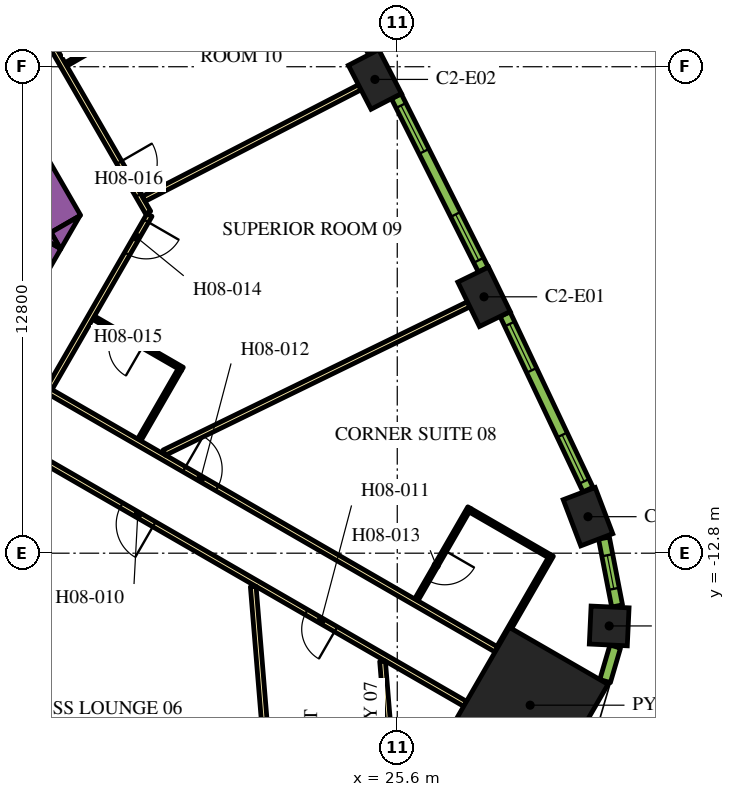
"""IFC4 building model, lengths in metres.
Left out: names, types, materials, properties, quantities, classifications, styles, units other than length and angle.
Written with IfcOpenShell. Run it as: python <this file> out.ifc"""

import sys

from ifc_helpers import new_model, si_unit, direction, frame, frame_2d, origin, origin_2d, place, context, subcontext, project, spatial, polyline, rectangle, outline, extrude, element, fill, save


model = new_model("IFC4")
c1 = context("Model", 3, precision=1e-05, world=origin(), true_north=direction((0.0, 1.0)))
c2 = subcontext(c1, "Body", "Model", "MODEL_VIEW")
j1 = project(units=[si_unit("LENGTHUNIT", "METRE"), si_unit("PLANEANGLEUNIT", "RADIAN")], contexts=[c1])
p1 = place(None, origin())
s1 = spatial("IfcSite", under=j1, at=p1, CompositionType="ELEMENT")
p2 = place(p1, origin())
s2 = spatial("IfcBuilding", under=s1, at=p2, CompositionType="ELEMENT")
p3 = place(p2, frame((0.0, 0.0, 114.9)))
s3 = spatial("IfcBuildingStorey", under=s2, at=p3, CompositionType="ELEMENT", Elevation=114.9)
p4 = place(p3, frame((29.097, -16.799, 0.0), z_axis=(0.0, 0.0, 1.0), x_axis=(0.866025403784, -0.5, 0.0)))
e1 = element("IfcColumn", 1, at=p4, inside=s3, PredefinedType="COLUMN", context=c2, shape_type="SweptSolid", body=[
    extrude(rectangle(XDim=3.0, YDim=3.0, at=origin_2d()), origin(), (0.0, 0.0, 1.0), 3.9),
])
p5 = place(p3, frame((31.177, -14.714, 0.0), z_axis=(0.0, 0.0, 1.0), x_axis=(0.046756026083, 0.998906338965, 0.0)))
e2 = element("IfcColumn", 2, at=p5, inside=s3, PredefinedType="COLUMN", context=c2, shape_type="SweptSolid", body=[
    extrude(rectangle(XDim=1.0, YDim=1.0, at=origin_2d()), origin(), (0.0, 0.0, 1.0), 3.9),
])
for number, where, z_axis, x_axis in (
    (3, (30.619, -11.839, 0.0), (0.0, 0.0, 1.0), (-0.355, 0.935, 0.0)),
    (4, (27.883, -6.054, 0.0), (0.0, 0.0, 1.0), (-0.438, 0.899, 0.0)),
    (5, (25.012, -0.334, 0.0), (0.0, 0.0, 1.0), (-0.459, 0.888, 0.0)),
):
    element("IfcColumn", number, at=place(p3, frame(where, z_axis=z_axis, x_axis=x_axis)), inside=s3, PredefinedType="COLUMN", context=c2, shape_type="SweptSolid", body=[
        extrude(rectangle(XDim=1.3, YDim=0.9, at=origin_2d()), origin(), (0.0, 0.0, 1.0), 3.9),
    ])
p6 = place(p3, frame((6.776, 13.364, 0.0), z_axis=(0.0, 0.0, 1.0), x_axis=(0.500004177138, -0.8660229921, 0.0)))
e6 = element("IfcWall", 6, at=p6, inside=s3, PredefinedType="SOLIDWALL", context=c2, shape_type="SweptSolid", body=[
    extrude(rectangle(XDim=20.204, YDim=0.9, at=frame_2d((10.102, 0.0))), origin(), (0.0, 0.0, 1.0), 3.9),
])
p7 = place(p3, origin())
e7 = element("IfcWall", 7, at=p7, inside=s3, PredefinedType="SOLIDWALL", context=c2, shape_type="SweptSolid", body=[
    extrude(outline(polyline([(16.743, -4.8), (16.489, -4.36), (17.251, -3.92), (16.743, -4.8)])), origin(), (0.0, 0.0, 1.0), 3.9),
])
p8 = place(p3, frame((11.943, -12.214, 0.0), z_axis=(0.0, 0.0, 1.0), x_axis=(0.49998092645, 0.866036415623, 0.0)))
e8 = element("IfcWall", 8, at=p8, inside=s3, PredefinedType="SOLIDWALL", context=c2, shape_type="SweptSolid", body=[
    extrude(rectangle(XDim=8.83, YDim=0.9, at=frame_2d((4.415, 0.0))), origin(), (0.0, 0.0, 1.0), 3.9),
])
e9 = element("IfcWall", 9, at=p7, inside=s3, PredefinedType="SOLIDWALL", context=c2, shape_type="SweptSolid", body=[
    extrude(outline(polyline([(16.223, -3.9), (16.732, -4.78), (15.969, -4.34), (16.223, -3.9)])), origin(), (0.0, 0.0, 1.0), 3.9),
])
p9 = place(p3, frame((16.412, -8.523, 0.0), z_axis=(0.0, 0.0, 1.0), x_axis=(0.866025629663, -0.499999608766, 0.0)))
e10 = element("IfcWall", 10, at=p9, inside=s3, PredefinedType="PARTITIONING", context=c2, shape_type="SweptSolid", body=[
    extrude(rectangle(XDim=13.624, YDim=0.15, at=frame_2d((6.812, 0.0))), origin(), (0.0, 0.0, 1.0), 2.75),
])
p10 = place(p9, frame((4.134, 0.0, 0.0)))
e11 = element("IfcOpeningElement", 11, at=p10, cuts=e10, PredefinedType="OPENING", context=c2, shape_type="SweptSolid", body=[
    extrude(rectangle(XDim=1.0, YDim=2.1, at=frame_2d((0.5, 1.05))), frame((0.0, 0.085, 0.0), z_axis=(0.0, -1.0, 0.0), x_axis=(1.0, 0.0, 0.0)), (0.0, 0.0, 1.0), 0.17),
])
p11 = place(p3, frame((19.081, -3.9, 0.0), z_axis=(0.0, 0.0, 1.0), x_axis=(-0.499974327079, -0.866040225545, 0.0)))
e12 = element("IfcWall", 12, at=p11, inside=s3, PredefinedType="PARTITIONING", context=c2, shape_type="SweptSolid", body=[
    extrude(rectangle(XDim=5.258, YDim=0.15, at=frame_2d((2.629, 0.0))), origin(), (0.0, 0.0, 1.0), 2.75),
])
p12 = place(p11, frame((0.18, 0.0, 0.0)))
e13 = element("IfcOpeningElement", 13, at=p12, cuts=e12, PredefinedType="OPENING", context=c2, shape_type="SweptSolid", body=[
    extrude(rectangle(XDim=1.0, YDim=2.1, at=frame_2d((0.5, 1.05))), frame((0.0, 0.085, 0.0), z_axis=(0.0, -1.0, 0.0), x_axis=(1.0, 0.0, 0.0)), (0.0, 0.0, 1.0), 0.17),
])
p13 = place(p3, frame((6.163, 18.475, 0.0), z_axis=(0.0, 0.0, 1.0), x_axis=(0.500001317485, -0.866024643133, 0.0)))
e14 = element("IfcWall", 14, at=p13, inside=s3, PredefinedType="PARTITIONING", context=c2, shape_type="SweptSolid", body=[
    extrude(rectangle(XDim=25.767, YDim=0.15, at=frame_2d((12.883, 0.0))), origin(), (0.0, 0.0, 1.0), 2.75),
])
p14 = place(p13, frame((24.241, 0.0, 0.0)))
e15 = element("IfcOpeningElement", 15, at=p14, cuts=e14, PredefinedType="OPENING", context=c2, shape_type="SweptSolid", body=[
    extrude(rectangle(XDim=1.0, YDim=2.1, at=frame_2d((0.5, 1.05))), frame((0.0, 0.085, 0.0), z_axis=(0.0, -1.0, 0.0), x_axis=(1.0, 0.0, 0.0)), (0.0, 0.0, 1.0), 0.17),
])
p15 = place(p13, frame((13.144, 0.0, 0.0)))
e16 = element("IfcOpeningElement", 16, at=p15, cuts=e14, PredefinedType="OPENING", context=c2, shape_type="SweptSolid", body=[
    extrude(rectangle(XDim=1.0, YDim=2.1, at=frame_2d((0.5, 1.05))), frame((0.0, 0.085, 0.0), z_axis=(0.0, -1.0, 0.0), x_axis=(1.0, 0.0, 0.0)), (0.0, 0.0, 1.0), 0.17),
])
p16 = place(p13, frame((10.874, 0.0, 0.0)))
e17 = element("IfcOpeningElement", 17, at=p16, cuts=e14, PredefinedType="OPENING", context=c2, shape_type="SweptSolid", body=[
    extrude(rectangle(XDim=0.9, YDim=2.1, at=frame_2d((0.45, 1.05))), frame((0.0, 0.085, 0.0), z_axis=(0.0, -1.0, 0.0), x_axis=(1.0, 0.0, 0.0)), (0.0, 0.0, 1.0), 0.17),
])
p17 = place(p13, frame((3.718, 0.0, 0.0)))
e18 = element("IfcOpeningElement", 18, at=p17, cuts=e14, PredefinedType="OPENING", context=c2, shape_type="SweptSolid", body=[
    extrude(rectangle(XDim=1.0, YDim=2.1, at=frame_2d((0.5, 1.05))), frame((0.0, 0.085, 0.0), z_axis=(0.0, -1.0, 0.0), x_axis=(1.0, 0.0, 0.0)), (0.0, 0.0, 1.0), 0.17),
])
p18 = place(p13, frame((2.411, 0.0, 0.0)))
e19 = element("IfcOpeningElement", 19, at=p18, cuts=e14, PredefinedType="OPENING", context=c2, shape_type="SweptSolid", body=[
    extrude(rectangle(XDim=1.0, YDim=2.1, at=frame_2d((0.5, 1.05))), frame((0.0, 0.085, 0.0), z_axis=(0.0, -1.0, 0.0), x_axis=(1.0, 0.0, 0.0)), (0.0, 0.0, 1.0), 0.17),
])
p19 = place(p3, frame((27.386, -16.764, 0.0), z_axis=(0.0, 0.0, 1.0), x_axis=(-0.866022585856, 0.500004880763, 0.0)))
e20 = element("IfcWall", 20, at=p19, inside=s3, PredefinedType="PARTITIONING", context=c2, shape_type="SweptSolid", body=[
    extrude(rectangle(XDim=13.544, YDim=0.15, at=frame_2d((6.772, 0.0))), origin(), (0.0, 0.0, 1.0), 2.75),
])
p20 = place(p19, frame((9.447, 0.0, 0.0)))
e21 = element("IfcOpeningElement", 21, at=p20, cuts=e20, PredefinedType="OPENING", context=c2, shape_type="SweptSolid", body=[
    extrude(rectangle(XDim=1.0, YDim=2.1, at=frame_2d((0.5, 1.05))), frame((0.0, 0.085, 0.0), z_axis=(0.0, -1.0, 0.0), x_axis=(1.0, 0.0, 0.0)), (0.0, 0.0, 1.0), 0.17),
])
p21 = place(p19, frame((3.926, 0.0, 0.0)))
e22 = element("IfcOpeningElement", 22, at=p21, cuts=e20, PredefinedType="OPENING", context=c2, shape_type="SweptSolid", body=[
    extrude(rectangle(XDim=0.9, YDim=2.1, at=frame_2d((0.45, 1.05))), frame((0.0, 0.085, 0.0), z_axis=(0.0, -1.0, 0.0), x_axis=(1.0, 0.0, 0.0)), (0.0, 0.0, 1.0), 0.17),
])
p22 = place(p3, frame((24.613, -0.541, 0.0), z_axis=(0.0, 0.0, 1.0), x_axis=(-0.888459912519, -0.458954228487, 0.0)))
e23 = element("IfcWall", 23, at=p22, inside=s3, PredefinedType="PARTITIONING", context=c2, shape_type="SweptSolid", body=[
    extrude(rectangle(XDim=6.392, YDim=0.15, at=frame_2d((3.196, 0.0))), origin(), (0.0, 0.0, 1.0), 2.75),
])
p23 = place(p3, frame((27.478, -6.251, 0.0), z_axis=(0.0, 0.0, 1.0), x_axis=(-0.898940618603, -0.438070501432, 0.0)))
e24 = element("IfcWall", 24, at=p23, inside=s3, PredefinedType="PARTITIONING", context=c2, shape_type="SweptSolid", body=[
    extrude(rectangle(XDim=8.909, YDim=0.15, at=frame_2d((4.455, 0.0))), origin(), (0.0, 0.0, 1.0), 2.75),
])
p24 = place(p3, frame((22.412, -21.016, 0.0), z_axis=(0.0, 0.0, 1.0), x_axis=(-0.081744540534, 0.996653314896, 0.0)))
e25 = element("IfcWall", 25, at=p24, inside=s3, PredefinedType="PARTITIONING", context=c2, shape_type="SweptSolid", body=[
    extrude(rectangle(XDim=7.362, YDim=0.15, at=frame_2d((3.681, 0.0))), origin(), (0.0, 0.0, 1.0), 2.75),
])
p25 = place(p3, frame((25.582, -20.138, 0.0), z_axis=(0.0, 0.0, 1.0), x_axis=(-0.081746132986, 0.996653184283, 0.0)))
e26 = element("IfcWall", 26, at=p25, inside=s3, PredefinedType="PARTITIONING", context=c2, shape_type="SweptSolid", body=[
    extrude(rectangle(XDim=4.51, YDim=0.15, at=frame_2d((2.255, 0.0))), origin(), (0.0, 0.0, 1.0), 2.75),
])
p26 = place(p3, frame((27.5, -11.605, 0.0), z_axis=(0.0, 0.0, 1.0), x_axis=(-0.500049511043, -0.865996816683, 0.0)))
e27 = element("IfcWall", 27, at=p26, inside=s3, PredefinedType="PARTITIONING", context=c2, shape_type="SweptSolid", body=[
    extrude(rectangle(XDim=2.8, YDim=0.1, at=frame_2d((1.4, 0.0))), origin(), (0.0, 0.0, 1.0), 2.75),
])
p27 = place(p26, frame((1.3, 0.0, 0.0)))
e28 = element("IfcOpeningElement", 28, at=p27, cuts=e27, PredefinedType="OPENING", context=c2, shape_type="SweptSolid", body=[
    extrude(rectangle(XDim=0.9, YDim=2.1, at=frame_2d((0.45, 1.05))), frame((0.0, 0.06, 0.0), z_axis=(0.0, -1.0, 0.0), x_axis=(1.0, 0.0, 0.0)), (0.0, 0.0, 1.0), 0.12),
])
p28 = place(p3, frame((27.519, -11.673, 0.0), z_axis=(0.0, 0.0, 1.0), x_axis=(0.866024647952, -0.500001309137, 0.0)))
e29 = element("IfcWall", 29, at=p28, inside=s3, PredefinedType="PARTITIONING", context=c2, shape_type="SweptSolid", body=[
    extrude(rectangle(XDim=2.4, YDim=0.1, at=frame_2d((1.2, 0.0))), origin(), (0.0, 0.0, 1.0), 2.75),
])
p29 = place(p3, frame((28.265, -15.28, 0.0), z_axis=(0.0, 0.0, 1.0), x_axis=(0.500049511043, 0.865996816683, 0.0)))
e30 = element("IfcWall", 30, at=p29, inside=s3, PredefinedType="PARTITIONING", context=c2, shape_type="SweptSolid", body=[
    extrude(rectangle(XDim=2.8, YDim=0.1, at=frame_2d((1.4, 0.0))), origin(), (0.0, 0.0, 1.0), 2.75),
])
p30 = place(p3, frame((19.946, -7.953, 0.0), z_axis=(0.0, 0.0, 1.0), x_axis=(-0.86599734893, 0.500048589285, 0.0)))
e31 = element("IfcWall", 31, at=p30, inside=s3, PredefinedType="PARTITIONING", context=c2, shape_type="SweptSolid", body=[
    extrude(rectangle(XDim=2.7, YDim=0.1, at=frame_2d((1.35, 0.0))), origin(), (0.0, 0.0, 1.0), 2.75),
])
p31 = place(p30, frame((1.2, 0.0, 0.0)))
e32 = element("IfcOpeningElement", 32, at=p31, cuts=e31, PredefinedType="OPENING", context=c2, shape_type="SweptSolid", body=[
    extrude(rectangle(XDim=0.9, YDim=2.1, at=frame_2d((0.45, 1.05))), frame((0.0, 0.06, 0.0), z_axis=(0.0, -1.0, 0.0), x_axis=(1.0, 0.0, 0.0)), (0.0, 0.0, 1.0), 0.12),
])
p32 = place(p3, frame((19.877, -7.972, 0.0), z_axis=(0.0, 0.0, 1.0), x_axis=(-0.500010206181, -0.866019511163, 0.0)))
e33 = element("IfcWall", 33, at=p32, inside=s3, PredefinedType="PARTITIONING", context=c2, shape_type="SweptSolid", body=[
    extrude(rectangle(XDim=2.13, YDim=0.1, at=frame_2d((1.065, 0.0))), origin(), (0.0, 0.0, 1.0), 2.75),
])
p33 = place(p3, frame((16.881, 0.061, 0.0), z_axis=(0.0, 0.0, 1.0), x_axis=(0.866019956843, 0.50000943426, 0.0)))
e34 = element("IfcWall", 34, at=p33, inside=s3, PredefinedType="PARTITIONING", context=c2, shape_type="SweptSolid", body=[
    extrude(rectangle(XDim=2.7, YDim=0.1, at=frame_2d((1.35, 0.0))), origin(), (0.0, 0.0, 1.0), 2.75),
])
p34 = place(p33, frame((0.6, 0.0, 0.0)))
e35 = element("IfcOpeningElement", 35, at=p34, cuts=e34, PredefinedType="OPENING", context=c2, shape_type="SweptSolid", body=[
    extrude(rectangle(XDim=0.9, YDim=2.1, at=frame_2d((0.45, 1.05))), frame((0.0, 0.06, 0.0), z_axis=(0.0, -1.0, 0.0), x_axis=(1.0, 0.0, 0.0)), (0.0, 0.0, 1.0), 0.12),
])
p35 = place(p3, frame((31.069, -16.165, 0.0), z_axis=(0.0, 0.0, 1.0), x_axis=(0.281454582132, 0.95957455062, 0.0)))
e36 = element("IfcWall", 36, at=p35, inside=s3, PredefinedType="SOLIDWALL", context=c2, shape_type="SweptSolid", body=[
    extrude(rectangle(XDim=0.947, YDim=0.29, at=frame_2d((0.474, 0.0))), origin(), (0.0, 0.0, 1.0), 3.65),
])
p36 = place(p3, frame((31.385, -14.189, 0.0), z_axis=(0.0, 0.0, 1.0), x_axis=(-0.190409913989, 0.981704672829, 0.0)))
e37 = element("IfcWall", 37, at=p36, inside=s3, PredefinedType="SOLIDWALL", context=c2, shape_type="SweptSolid", body=[
    extrude(rectangle(XDim=1.819, YDim=0.29, at=frame_2d((0.91, 0.0))), origin(), (0.0, 0.0, 1.0), 3.65),
])
p37 = place(p36, frame((0.46, 0.0, 0.9)))
e38 = element("IfcOpeningElement", 38, at=p37, cuts=e37, PredefinedType="OPENING", context=c2, shape_type="SweptSolid", body=[
    extrude(rectangle(XDim=0.9, YDim=2.15, at=frame_2d((0.45, 1.075))), frame((0.0, 0.155, 0.0), z_axis=(0.0, -1.0, 0.0), x_axis=(1.0, 0.0, 0.0)), (0.0, 0.0, 1.0), 0.31),
])
p38 = place(p3, frame((30.62, -11.127, 0.0), z_axis=(0.0, 0.0, 1.0), x_axis=(-0.427543726596, 0.903994669148, 0.0)))
e39 = element("IfcWall", 39, at=p38, inside=s3, PredefinedType="SOLIDWALL", context=c2, shape_type="SweptSolid", body=[
    extrude(rectangle(XDim=5.107, YDim=0.29, at=frame_2d((2.553, 0.0))), origin(), (0.0, 0.0, 1.0), 3.65),
])
p39 = place(p38, frame((0.24, 0.0, 0.9)))
e40 = element("IfcOpeningElement", 40, at=p39, cuts=e39, PredefinedType="OPENING", context=c2, shape_type="SweptSolid", body=[
    extrude(rectangle(XDim=1.35, YDim=2.15, at=frame_2d((0.675, 1.075))), frame((0.0, 0.155, 0.0), z_axis=(0.0, -1.0, 0.0), x_axis=(1.0, 0.0, 0.0)), (0.0, 0.0, 1.0), 0.31),
])
p40 = place(p38, frame((3.471, 0.0, 0.9)))
e41 = element("IfcOpeningElement", 41, at=p40, cuts=e39, PredefinedType="OPENING", context=c2, shape_type="SweptSolid", body=[
    extrude(rectangle(XDim=1.35, YDim=2.15, at=frame_2d((0.675, 1.075))), frame((0.0, 0.155, 0.0), z_axis=(0.0, -1.0, 0.0), x_axis=(1.0, 0.0, 0.0)), (0.0, 0.0, 1.0), 0.31),
])
p41 = place(p3, frame((27.864, -5.336, 0.0), z_axis=(0.0, 0.0, 1.0), x_axis=(-0.448534297211, 0.893765620409, 0.0)))
e42 = element("IfcWall", 42, at=p41, inside=s3, PredefinedType="SOLIDWALL", context=c2, shape_type="SweptSolid", body=[
    extrude(rectangle(XDim=5.1, YDim=0.29, at=frame_2d((2.55, 0.0))), origin(), (0.0, 0.0, 1.0), 3.65),
])
p42 = place(p41, frame((0.272, 0.0, 0.9)))
e43 = element("IfcOpeningElement", 43, at=p42, cuts=e42, PredefinedType="OPENING", context=c2, shape_type="SweptSolid", body=[
    extrude(rectangle(XDim=1.35, YDim=2.15, at=frame_2d((0.675, 1.075))), frame((0.0, 0.155, 0.0), z_axis=(0.0, -1.0, 0.0), x_axis=(1.0, 0.0, 0.0)), (0.0, 0.0, 1.0), 0.31),
])
p43 = place(p41, frame((3.478, 0.0, 0.9)))
e44 = element("IfcOpeningElement", 44, at=p43, cuts=e42, PredefinedType="OPENING", context=c2, shape_type="SweptSolid", body=[
    extrude(rectangle(XDim=1.35, YDim=2.15, at=frame_2d((0.675, 1.075))), frame((0.0, 0.155, 0.0), z_axis=(0.0, -1.0, 0.0), x_axis=(1.0, 0.0, 0.0)), (0.0, 0.0, 1.0), 0.31),
])
p44 = place(p3, frame((24.977, 0.383, 0.0), z_axis=(0.0, 0.0, 1.0), x_axis=(-0.469323203119, 0.883026461106, 0.0)))
e45 = element("IfcWall", 45, at=p44, inside=s3, PredefinedType="SOLIDWALL", context=c2, shape_type="SweptSolid", body=[
    extrude(rectangle(XDim=5.101, YDim=0.29, at=frame_2d((2.55, 0.0))), origin(), (0.0, 0.0, 1.0), 3.65),
])
p45 = place(p44, frame((0.273, 0.0, 0.9)))
e46 = element("IfcOpeningElement", 46, at=p45, cuts=e45, PredefinedType="OPENING", context=c2, shape_type="SweptSolid", body=[
    extrude(rectangle(XDim=1.35, YDim=2.15, at=frame_2d((0.675, 1.075))), frame((0.0, 0.155, 0.0), z_axis=(0.0, -1.0, 0.0), x_axis=(1.0, 0.0, 0.0)), (0.0, 0.0, 1.0), 0.31),
])
p46 = place(p44, frame((3.478, 0.0, 0.9)))
e47 = element("IfcOpeningElement", 47, at=p46, cuts=e45, PredefinedType="OPENING", context=c2, shape_type="SweptSolid", body=[
    extrude(rectangle(XDim=1.35, YDim=2.15, at=frame_2d((0.675, 1.075))), frame((0.0, 0.155, 0.0), z_axis=(0.0, -1.0, 0.0), x_axis=(1.0, 0.0, 0.0)), (0.0, 0.0, 1.0), 0.31),
])
p47 = place(p20, origin())
e48 = element("IfcDoor", 48, at=p47, inside=s3, OperationType="SINGLE_SWING_RIGHT", PredefinedType="DOOR", context=c2, shape_type="SweptSolid", body=[
    extrude(rectangle(XDim=1.0, YDim=2.1, at=frame_2d((0.5, 1.05))), frame((0.0, 0.025, 0.0), z_axis=(0.0, -1.0, 0.0), x_axis=(1.0, 0.0, 0.0)), (0.0, 0.0, 1.0), 0.05),
])
fill(e21, e48)
p48 = place(p21, origin())
e49 = element("IfcDoor", 49, at=p48, inside=s3, OperationType="SINGLE_SWING_LEFT", PredefinedType="DOOR", context=c2, shape_type="SweptSolid", body=[
    extrude(rectangle(XDim=0.9, YDim=2.1, at=frame_2d((0.45, 1.05))), frame((0.0, 0.025, 0.0), z_axis=(0.0, -1.0, 0.0), x_axis=(1.0, 0.0, 0.0)), (0.0, 0.0, 1.0), 0.05),
])
fill(e22, e49)
p49 = place(p10, origin())
e50 = element("IfcDoor", 50, at=p49, inside=s3, OperationType="SINGLE_SWING_LEFT", PredefinedType="DOOR", context=c2, shape_type="SweptSolid", body=[
    extrude(rectangle(XDim=1.0, YDim=2.1, at=frame_2d((0.5, 1.05))), frame((0.0, 0.025, 0.0), z_axis=(0.0, -1.0, 0.0), x_axis=(1.0, 0.0, 0.0)), (0.0, 0.0, 1.0), 0.05),
])
fill(e11, e50)
p50 = place(p27, origin())
e51 = element("IfcDoor", 51, at=p50, inside=s3, OperationType="SINGLE_SWING_LEFT", PredefinedType="DOOR", context=c2, shape_type="SweptSolid", body=[
    extrude(rectangle(XDim=0.9, YDim=2.1, at=frame_2d((0.45, 1.05))), frame((0.0, 0.025, 0.0), z_axis=(0.0, -1.0, 0.0), x_axis=(1.0, 0.0, 0.0)), (0.0, 0.0, 1.0), 0.05),
])
fill(e28, e51)
p51 = place(p12, origin())
e52 = element("IfcDoor", 52, at=p51, inside=s3, OperationType="SINGLE_SWING_LEFT", PredefinedType="DOOR", context=c2, shape_type="SweptSolid", body=[
    extrude(rectangle(XDim=1.0, YDim=2.1, at=frame_2d((0.5, 1.05))), frame((0.0, 0.025, 0.0), z_axis=(0.0, -1.0, 0.0), x_axis=(1.0, 0.0, 0.0)), (0.0, 0.0, 1.0), 0.05),
])
fill(e13, e52)
p52 = place(p31, origin())
e53 = element("IfcDoor", 53, at=p52, inside=s3, OperationType="SINGLE_SWING_RIGHT", PredefinedType="DOOR", context=c2, shape_type="SweptSolid", body=[
    extrude(rectangle(XDim=0.9, YDim=2.1, at=frame_2d((0.45, 1.05))), frame((0.0, 0.025, 0.0), z_axis=(0.0, -1.0, 0.0), x_axis=(1.0, 0.0, 0.0)), (0.0, 0.0, 1.0), 0.05),
])
fill(e32, e53)
p53 = place(p14, origin())
e54 = element("IfcDoor", 54, at=p53, inside=s3, OperationType="SINGLE_SWING_RIGHT", PredefinedType="DOOR", context=c2, shape_type="SweptSolid", body=[
    extrude(rectangle(XDim=1.0, YDim=2.1, at=frame_2d((0.5, 1.05))), frame((0.0, 0.025, 0.0), z_axis=(0.0, -1.0, 0.0), x_axis=(1.0, 0.0, 0.0)), (0.0, 0.0, 1.0), 0.05),
])
fill(e15, e54)
p54 = place(p34, origin())
e55 = element("IfcDoor", 55, at=p54, inside=s3, OperationType="SINGLE_SWING_LEFT", PredefinedType="DOOR", context=c2, shape_type="SweptSolid", body=[
    extrude(rectangle(XDim=0.9, YDim=2.1, at=frame_2d((0.45, 1.05))), frame((0.0, 0.025, 0.0), z_axis=(0.0, -1.0, 0.0), x_axis=(1.0, 0.0, 0.0)), (0.0, 0.0, 1.0), 0.05),
])
fill(e35, e55)
p55 = place(p37, origin())
e56 = element("IfcWindow", 56, at=p55, inside=s3, PartitioningType="SINGLE_PANEL", PredefinedType="WINDOW", context=c2, shape_type="SweptSolid", body=[
    extrude(rectangle(XDim=0.9, YDim=2.15, at=frame_2d((0.45, 1.075))), frame((0.0, 0.015, 0.0), z_axis=(0.0, -1.0, 0.0), x_axis=(1.0, 0.0, 0.0)), (0.0, 0.0, 1.0), 0.06),
])
fill(e38, e56)
p56 = place(p39, origin())
e57 = element("IfcWindow", 57, at=p56, inside=s3, PartitioningType="DOUBLE_PANEL_VERTICAL", PredefinedType="WINDOW", context=c2, shape_type="SweptSolid", body=[
    extrude(rectangle(XDim=1.35, YDim=2.15, at=frame_2d((0.675, 1.075))), frame((0.0, 0.015, 0.0), z_axis=(0.0, -1.0, 0.0), x_axis=(1.0, 0.0, 0.0)), (0.0, 0.0, 1.0), 0.06),
])
fill(e40, e57)
p57 = place(p40, origin())
e58 = element("IfcWindow", 58, at=p57, inside=s3, PartitioningType="DOUBLE_PANEL_VERTICAL", PredefinedType="WINDOW", context=c2, shape_type="SweptSolid", body=[
    extrude(rectangle(XDim=1.35, YDim=2.15, at=frame_2d((0.675, 1.075))), frame((0.0, 0.015, 0.0), z_axis=(0.0, -1.0, 0.0), x_axis=(1.0, 0.0, 0.0)), (0.0, 0.0, 1.0), 0.06),
])
fill(e41, e58)
p58 = place(p42, origin())
e59 = element("IfcWindow", 59, at=p58, inside=s3, PartitioningType="DOUBLE_PANEL_VERTICAL", PredefinedType="WINDOW", context=c2, shape_type="SweptSolid", body=[
    extrude(rectangle(XDim=1.35, YDim=2.15, at=frame_2d((0.675, 1.075))), frame((0.0, 0.015, 0.0), z_axis=(0.0, -1.0, 0.0), x_axis=(1.0, 0.0, 0.0)), (0.0, 0.0, 1.0), 0.06),
])
fill(e43, e59)
p59 = place(p43, origin())
e60 = element("IfcWindow", 60, at=p59, inside=s3, PartitioningType="DOUBLE_PANEL_VERTICAL", PredefinedType="WINDOW", context=c2, shape_type="SweptSolid", body=[
    extrude(rectangle(XDim=1.35, YDim=2.15, at=frame_2d((0.675, 1.075))), frame((0.0, 0.015, 0.0), z_axis=(0.0, -1.0, 0.0), x_axis=(1.0, 0.0, 0.0)), (0.0, 0.0, 1.0), 0.06),
])
fill(e44, e60)
save(model, sys.argv[1])
